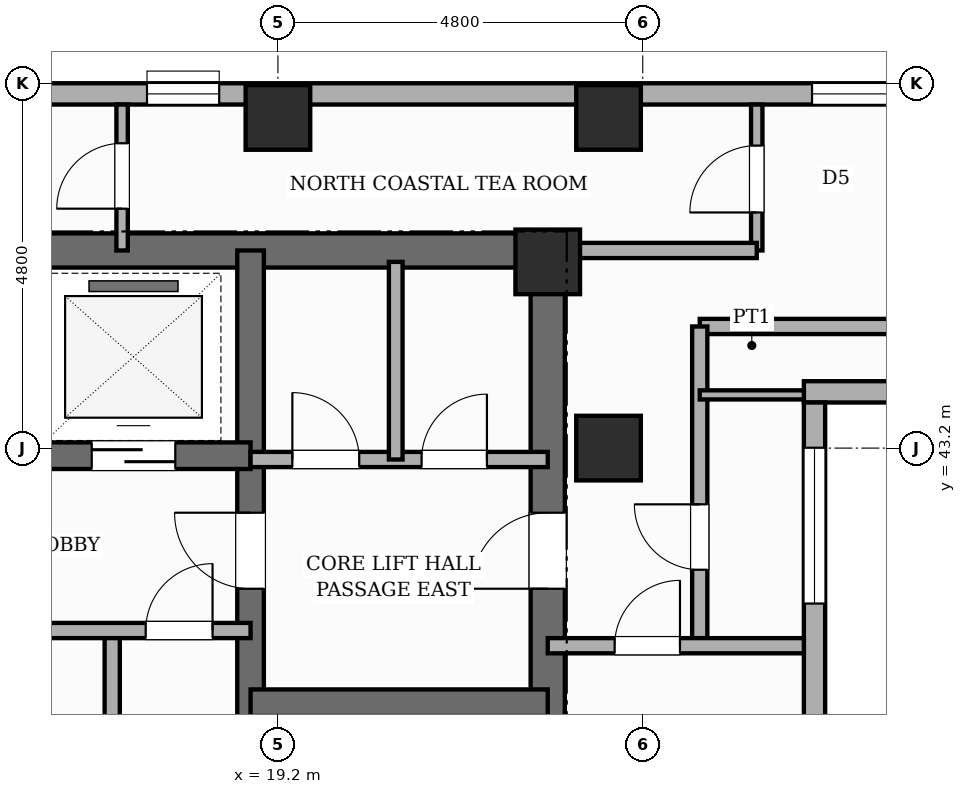
"""IFC4 building model, lengths in metres.
Left out: names, types, materials, properties, quantities, classifications, styles, units other than length and angle.
Written with IfcOpenShell. Run it as: python <this file> out.ifc"""

import sys

from ifc_helpers import new_model, si_unit, direction, frame, frame_2d, origin, origin_2d, place, context, subcontext, project, spatial, rectangle, extrude, element, fill, save


model = new_model("IFC4")
c1 = context("Model", 3, precision=1e-05, world=origin(), true_north=direction((0.0, 1.0)))
c2 = subcontext(c1, "Body", "Model", "MODEL_VIEW")
j1 = project(units=[si_unit("LENGTHUNIT", "METRE"), si_unit("PLANEANGLEUNIT", "RADIAN")], contexts=[c1])
p1 = place(None, origin())
s1 = spatial("IfcSite", under=j1, at=p1, CompositionType="ELEMENT")
p2 = place(p1, origin())
s2 = spatial("IfcBuilding", under=s1, at=p2, CompositionType="ELEMENT")
p3 = place(p2, frame((0.0, 0.0, 203.8)))
s3 = spatial("IfcBuildingStorey", under=s2, at=p3, CompositionType="ELEMENT", Elevation=203.8)
p4 = place(p3, frame((22.75, 30.675, 0.0), z_axis=(0.0, 0.0, 1.0), x_axis=(0.0, 1.0, 0.0)))
e1 = element("IfcWall", 1, at=p4, inside=s3, PredefinedType="SHEAR", context=c2, shape_type="SweptSolid", body=[
    extrude(rectangle(XDim=15.35, YDim=0.45, at=frame_2d((7.675, 0.0))), origin(), (0.0, 0.0, 1.0), 3.6),
])
p5 = place(p4, frame((10.675, 0.0, 0.0)))
e2 = element("IfcOpeningElement", 2, at=p5, cuts=e1, PredefinedType="OPENING", context=c2, shape_type="SweptSolid", body=[
    extrude(rectangle(XDim=1.0, YDim=2.15, at=frame_2d((0.5, 1.075))), frame((0.0, 0.235, 0.0), z_axis=(0.0, -1.0, 0.0), x_axis=(1.0, 0.0, 0.0)), (0.0, 0.0, 1.0), 0.47),
])
p6 = place(p3, frame((6.05, 45.8, 0.0), z_axis=(0.0, 0.0, 1.0), x_axis=(1.0, 0.0, 0.0)))
e3 = element("IfcWall", 3, at=p6, inside=s3, PredefinedType="SHEAR", context=c2, shape_type="SweptSolid", body=[
    extrude(rectangle(XDim=16.7, YDim=0.45, at=frame_2d((8.35, 0.0))), origin(), (0.0, 0.0, 1.0), 3.6),
])
p7 = place(p3, frame((18.84, 30.9, 0.0), z_axis=(0.0, 0.0, 1.0), x_axis=(0.0, 1.0, 0.0)))
e4 = element("IfcWall", 4, at=p7, inside=s3, PredefinedType="SHEAR", context=c2, shape_type="SweptSolid", body=[
    extrude(rectangle(XDim=14.9, YDim=0.35, at=frame_2d((7.45, 0.0))), origin(), (0.0, 0.0, 1.0), 3.6),
])
p8 = place(p7, frame((0.65, 0.0, 0.0)))
e5 = element("IfcOpeningElement", 5, at=p8, cuts=e4, PredefinedType="OPENING", context=c2, shape_type="SweptSolid", body=[
    extrude(rectangle(XDim=0.95, YDim=2.1, at=frame_2d((0.475, 1.05))), frame((0.0, 0.185, 0.0), z_axis=(0.0, -1.0, 0.0), x_axis=(1.0, 0.0, 0.0)), (0.0, 0.0, 1.0), 0.37),
])
p9 = place(p7, frame((10.45, 0.0, 0.0)))
e6 = element("IfcOpeningElement", 6, at=p9, cuts=e4, PredefinedType="OPENING", context=c2, shape_type="SweptSolid", body=[
    extrude(rectangle(XDim=1.0, YDim=2.15, at=frame_2d((0.5, 1.075))), frame((0.0, 0.185, 0.0), z_axis=(0.0, -1.0, 0.0), x_axis=(1.0, 0.0, 0.0)), (0.0, 0.0, 1.0), 0.37),
])
p10 = place(p3, frame((18.84, 39.85, 0.0), z_axis=(0.0, 0.0, 1.0), x_axis=(1.0, 0.0, 0.0)))
e7 = element("IfcWall", 7, at=p10, inside=s3, PredefinedType="SHEAR", context=c2, shape_type="SweptSolid", body=[
    extrude(rectangle(XDim=3.91, YDim=0.35, at=frame_2d((1.955, 0.0))), origin(), (0.0, 0.0, 1.0), 3.6),
])
p11 = place(p3, frame((9.96, 43.1, 0.0), z_axis=(0.0, 0.0, 1.0), x_axis=(1.0, 0.0, 0.0)))
e8 = element("IfcWall", 8, at=p11, inside=s3, PredefinedType="SHEAR", context=c2, shape_type="SweptSolid", body=[
    extrude(rectangle(XDim=8.88, YDim=0.35, at=frame_2d((4.44, 0.0))), origin(), (0.0, 0.0, 1.0), 3.6),
])
p12 = place(p11, frame((0.99, 0.0, 0.0)))
e9 = element("IfcOpeningElement", 9, at=p12, cuts=e8, PredefinedType="OPENING", context=c2, shape_type="SweptSolid", body=[
    extrude(rectangle(XDim=1.1, YDim=2.15, at=frame_2d((0.55, 1.075))), frame((0.0, 0.185, 0.0), z_axis=(0.0, -1.0, 0.0), x_axis=(1.0, 0.0, 0.0)), (0.0, 0.0, 1.0), 0.37),
])
p13 = place(p11, frame((3.89, 0.0, 0.0)))
e10 = element("IfcOpeningElement", 10, at=p13, cuts=e8, PredefinedType="OPENING", context=c2, shape_type="SweptSolid", body=[
    extrude(rectangle(XDim=1.1, YDim=2.15, at=frame_2d((0.55, 1.075))), frame((0.0, 0.185, 0.0), z_axis=(0.0, -1.0, 0.0), x_axis=(1.0, 0.0, 0.0)), (0.0, 0.0, 1.0), 0.37),
])
p14 = place(p11, frame((6.79, 0.0, 0.0)))
e11 = element("IfcOpeningElement", 11, at=p14, cuts=e8, PredefinedType="OPENING", context=c2, shape_type="SweptSolid", body=[
    extrude(rectangle(XDim=1.1, YDim=2.15, at=frame_2d((0.55, 1.075))), frame((0.0, 0.185, 0.0), z_axis=(0.0, -1.0, 0.0), x_axis=(1.0, 0.0, 0.0)), (0.0, 0.0, 1.0), 0.37),
])
for number, where, z_axis, x_axis in (
    (12, (19.2, 47.55, 0.0), (0.0, 0.0, 1.0), (1.0, 0.0, 0.0)),
    (13, (22.75, 45.65, 0.0), (0.0, 0.0, 1.0), (1.0, 0.0, 0.0)),
    (14, (23.55, 43.2, 0.0), (0.0, 0.0, 1.0), (1.0, 0.0, 0.0)),
    (15, (23.55, 47.55, 0.0), (0.0, 0.0, 1.0), (1.0, 0.0, 0.0)),
):
    element("IfcColumn", number, at=place(p3, frame(where, z_axis=z_axis, x_axis=x_axis)), inside=s3, PredefinedType="COLUMN", context=c2, shape_type="SweptSolid", body=[
        extrude(rectangle(XDim=0.85, YDim=0.85, at=origin_2d()), origin(), (0.0, 0.0, 1.0), 3.6),
    ])
p15 = place(p3, frame((7.2, 47.86, 0.0), z_axis=(0.0, 0.0, 1.0), x_axis=(1.0, 0.0, 0.0)))
e16 = element("IfcWall", 16, at=p15, inside=s3, PredefinedType="STANDARD", context=c2, shape_type="SweptSolid", body=[
    extrude(rectangle(XDim=43.2, YDim=0.28, at=frame_2d((21.6, 0.0))), origin(), (0.0, 0.0, 1.0), 2.66),
])
p16 = place(p15, frame((19.028, 0.0, 0.65)))
e17 = element("IfcOpeningElement", 17, at=p16, cuts=e16, PredefinedType="OPENING", context=c2, shape_type="SweptSolid", body=[
    extrude(rectangle(XDim=1.4, YDim=1.1, at=frame_2d((0.7, 0.55))), frame((0.0, 0.15, 0.0), z_axis=(0.0, -1.0, 0.0), x_axis=(1.0, 0.0, 0.0)), (0.0, 0.0, 1.0), 0.3),
])
p17 = place(p15, frame((0.308, 0.0, 0.65)))
e18 = element("IfcOpeningElement", 18, at=p17, cuts=e16, PredefinedType="OPENING", context=c2, shape_type="SweptSolid", body=[
    extrude(rectangle(XDim=1.4, YDim=1.1, at=frame_2d((0.7, 0.55))), frame((0.0, 0.15, 0.0), z_axis=(0.0, -1.0, 0.0), x_axis=(1.0, 0.0, 0.0)), (0.0, 0.0, 1.0), 0.3),
])
p18 = place(p15, frame((10.278, 0.0, 0.45)))
e19 = element("IfcOpeningElement", 19, at=p18, cuts=e16, PredefinedType="OPENING", context=c2, shape_type="SweptSolid", body=[
    extrude(rectangle(XDim=0.95, YDim=1.8, at=frame_2d((0.475, 0.9))), frame((0.0, 0.15, 0.0), z_axis=(0.0, -1.0, 0.0), x_axis=(1.0, 0.0, 0.0)), (0.0, 0.0, 1.0), 0.3),
])
p19 = place(p3, frame((38.4, 43.94, 0.0), z_axis=(0.0, 0.0, 1.0), x_axis=(-1.0, 0.0, 0.0)))
e20 = element("IfcWall", 20, at=p19, inside=s3, PredefinedType="STANDARD", context=c2, shape_type="SweptSolid", body=[
    extrude(rectangle(XDim=12.28, YDim=0.28, at=frame_2d((6.14, 0.0))), origin(), (0.0, 0.0, 1.0), 3.38),
])
p20 = place(p19, frame((5.115, 0.0, 0.8)))
e21 = element("IfcOpeningElement", 21, at=p20, cuts=e20, PredefinedType="OPENING", context=c2, shape_type="SweptSolid", body=[
    extrude(rectangle(XDim=2.05, YDim=1.95, at=frame_2d((1.025, 0.975))), frame((0.0, 0.15, 0.0), z_axis=(0.0, -1.0, 0.0), x_axis=(1.0, 0.0, 0.0)), (0.0, 0.0, 1.0), 0.3),
])
p21 = place(p3, frame((26.26, 43.8, 0.0), z_axis=(0.0, 0.0, 1.0), x_axis=(0.0, -1.0, 0.0)))
e22 = element("IfcWall", 22, at=p21, inside=s3, PredefinedType="STANDARD", context=c2, shape_type="SweptSolid", body=[
    extrude(rectangle(XDim=15.0, YDim=0.28, at=frame_2d((7.5, 0.0))), origin(), (0.0, 0.0, 1.0), 3.38),
])
p22 = place(p21, frame((10.59, 0.0, 0.8)))
e23 = element("IfcOpeningElement", 23, at=p22, cuts=e22, PredefinedType="OPENING", context=c2, shape_type="SweptSolid", body=[
    extrude(rectangle(XDim=2.05, YDim=1.95, at=frame_2d((1.025, 0.975))), frame((0.0, 0.15, 0.0), z_axis=(0.0, -1.0, 0.0), x_axis=(1.0, 0.0, 0.0)), (0.0, 0.0, 1.0), 0.3),
])
p23 = place(p21, frame((5.245, 0.0, 0.8)))
e24 = element("IfcOpeningElement", 24, at=p23, cuts=e22, PredefinedType="OPENING", context=c2, shape_type="SweptSolid", body=[
    extrude(rectangle(XDim=2.05, YDim=1.95, at=frame_2d((1.025, 0.975))), frame((0.0, 0.15, 0.0), z_axis=(0.0, -1.0, 0.0), x_axis=(1.0, 0.0, 0.0)), (0.0, 0.0, 1.0), 0.3),
])
p24 = place(p21, frame((0.595, 0.0, 0.8)))
e25 = element("IfcOpeningElement", 25, at=p24, cuts=e22, PredefinedType="OPENING", context=c2, shape_type="SweptSolid", body=[
    extrude(rectangle(XDim=2.05, YDim=1.95, at=frame_2d((1.025, 0.975))), frame((0.0, 0.15, 0.0), z_axis=(0.0, -1.0, 0.0), x_axis=(1.0, 0.0, 0.0)), (0.0, 0.0, 1.0), 0.3),
])
p25 = place(p3, frame((17.02, 35.65, 0.0), z_axis=(0.0, 0.0, 1.0), x_axis=(0.0, 1.0, 0.0)))
e26 = element("IfcWall", 26, at=p25, inside=s3, PredefinedType="POLYGONAL", context=c2, shape_type="SweptSolid", body=[
    extrude(rectangle(XDim=5.15, YDim=0.2, at=frame_2d((2.575, 0.0))), origin(), (0.0, 0.0, 1.0), 3.38),
])
p26 = place(p3, frame((9.96, 40.8, 0.0), z_axis=(0.0, 0.0, 1.0), x_axis=(1.0, 0.0, 0.0)))
e27 = element("IfcWall", 27, at=p26, inside=s3, PredefinedType="POLYGONAL", context=c2, shape_type="SweptSolid", body=[
    extrude(rectangle(XDim=8.88, YDim=0.2, at=frame_2d((4.44, 0.0))), origin(), (0.0, 0.0, 1.0), 3.38),
])
p27 = place(p26, frame((7.5, 0.0, 0.0)))
e28 = element("IfcOpeningElement", 28, at=p27, cuts=e27, PredefinedType="OPENING", context=c2, shape_type="SweptSolid", body=[
    extrude(rectangle(XDim=0.88, YDim=2.1, at=frame_2d((0.44, 1.05))), frame((0.0, 0.11, 0.0), z_axis=(0.0, -1.0, 0.0), x_axis=(1.0, 0.0, 0.0)), (0.0, 0.0, 1.0), 0.22),
])
p28 = place(p26, frame((3.6, 0.0, 0.0)))
e29 = element("IfcOpeningElement", 29, at=p28, cuts=e27, PredefinedType="OPENING", context=c2, shape_type="SweptSolid", body=[
    extrude(rectangle(XDim=0.88, YDim=2.1, at=frame_2d((0.44, 1.05))), frame((0.0, 0.11, 0.0), z_axis=(0.0, -1.0, 0.0), x_axis=(1.0, 0.0, 0.0)), (0.0, 0.0, 1.0), 0.22),
])
p29 = place(p3, frame((18.84, 43.05, 0.0), z_axis=(0.0, 0.0, 1.0), x_axis=(1.0, 0.0, 0.0)))
e30 = element("IfcWall", 30, at=p29, inside=s3, PredefinedType="POLYGONAL", context=c2, shape_type="SweptSolid", body=[
    extrude(rectangle(XDim=3.91, YDim=0.2, at=frame_2d((1.955, 0.0))), origin(), (0.0, 0.0, 1.0), 2.66),
])
p30 = place(p29, frame((0.55, 0.0, 0.0)))
e31 = element("IfcOpeningElement", 31, at=p30, cuts=e30, PredefinedType="OPENING", context=c2, shape_type="SweptSolid", body=[
    extrude(rectangle(XDim=0.88, YDim=2.1, at=frame_2d((0.44, 1.05))), frame((0.0, 0.11, 0.0), z_axis=(0.0, -1.0, 0.0), x_axis=(1.0, 0.0, 0.0)), (0.0, 0.0, 1.0), 0.22),
])
p31 = place(p29, frame((2.25, 0.0, 0.0)))
e32 = element("IfcOpeningElement", 32, at=p31, cuts=e30, PredefinedType="OPENING", context=c2, shape_type="SweptSolid", body=[
    extrude(rectangle(XDim=0.86, YDim=2.1, at=frame_2d((0.43, 1.05))), frame((0.0, 0.11, 0.0), z_axis=(0.0, -1.0, 0.0), x_axis=(1.0, 0.0, 0.0)), (0.0, 0.0, 1.0), 0.22),
])
p32 = place(p3, frame((20.75, 43.05, 0.0), z_axis=(0.0, 0.0, 1.0), x_axis=(0.0, 1.0, 0.0)))
e33 = element("IfcWall", 33, at=p32, inside=s3, PredefinedType="PLUMBINGWALL", context=c2, shape_type="SweptSolid", body=[
    extrude(rectangle(XDim=2.6, YDim=0.18, at=frame_2d((1.3, 0.0))), origin(), (0.0, 0.0, 1.0), 3.38),
])
p33 = place(p3, frame((25.5, 45.8, 0.0), z_axis=(0.0, 0.0, 1.0), x_axis=(0.0, 1.0, 0.0)))
e34 = element("IfcWall", 34, at=p33, inside=s3, PredefinedType="PARTITIONING", context=c2, shape_type="SweptSolid", body=[
    extrude(rectangle(XDim=1.92, YDim=0.15, at=frame_2d((0.96, 0.0))), origin(), (0.0, 0.0, 1.0), 3.38),
])
p34 = place(p33, frame((0.5, 0.0, 0.0)))
e35 = element("IfcOpeningElement", 35, at=p34, cuts=e34, PredefinedType="OPENING", context=c2, shape_type="SweptSolid", body=[
    extrude(rectangle(XDim=0.88, YDim=2.1, at=frame_2d((0.44, 1.05))), frame((0.0, 0.085, 0.0), z_axis=(0.0, -1.0, 0.0), x_axis=(1.0, 0.0, 0.0)), (0.0, 0.0, 1.0), 0.17),
])
p35 = place(p3, frame((22.75, 45.8, 0.0), z_axis=(0.0, 0.0, 1.0), x_axis=(1.0, 0.0, 0.0)))
e36 = element("IfcWall", 36, at=p35, inside=s3, PredefinedType="PARTITIONING", context=c2, shape_type="SweptSolid", body=[
    extrude(rectangle(XDim=2.75, YDim=0.2, at=frame_2d((1.375, 0.0))), origin(), (0.0, 0.0, 1.0), 3.38),
])
p36 = place(p3, frame((17.15, 45.8, 0.0), z_axis=(0.0, 0.0, 1.0), x_axis=(0.0, 1.0, 0.0)))
e37 = element("IfcWall", 37, at=p36, inside=s3, PredefinedType="PARTITIONING", context=c2, shape_type="SweptSolid", body=[
    extrude(rectangle(XDim=1.92, YDim=0.15, at=frame_2d((0.96, 0.0))), origin(), (0.0, 0.0, 1.0), 3.38),
])
p37 = place(p36, frame((0.55, 0.0, 0.0)))
e38 = element("IfcOpeningElement", 38, at=p37, cuts=e37, PredefinedType="OPENING", context=c2, shape_type="SweptSolid", body=[
    extrude(rectangle(XDim=0.86, YDim=2.1, at=frame_2d((0.43, 1.05))), frame((0.0, 0.085, 0.0), z_axis=(0.0, -1.0, 0.0), x_axis=(1.0, 0.0, 0.0)), (0.0, 0.0, 1.0), 0.17),
])
p38 = place(p3, frame((24.75, 44.8, 0.0), z_axis=(0.0, 0.0, 1.0), x_axis=(1.0, 0.0, 0.0)))
e39 = element("IfcWall", 39, at=p38, inside=s3, PredefinedType="PARTITIONING", context=c2, shape_type="SweptSolid", body=[
    extrude(rectangle(XDim=17.3, YDim=0.2, at=frame_2d((8.65, 0.0))), origin(), (0.0, 0.0, 1.0), 3.38),
])
p39 = place(p38, frame((6.2, 0.0, 0.0)))
e40 = element("IfcOpeningElement", 40, at=p39, cuts=e39, PredefinedType="OPENING", context=c2, shape_type="SweptSolid", body=[
    extrude(rectangle(XDim=0.95, YDim=2.15, at=frame_2d((0.475, 1.075))), frame((0.0, 0.11, 0.0), z_axis=(0.0, -1.0, 0.0), x_axis=(1.0, 0.0, 0.0)), (0.0, 0.0, 1.0), 0.22),
])
p40 = place(p3, frame((24.75, 40.6, 0.0), z_axis=(0.0, 0.0, 1.0), x_axis=(0.0, 1.0, 0.0)))
e41 = element("IfcWall", 41, at=p40, inside=s3, PredefinedType="PARTITIONING", context=c2, shape_type="SweptSolid", body=[
    extrude(rectangle(XDim=4.2, YDim=0.2, at=frame_2d((2.1, 0.0))), origin(), (0.0, 0.0, 1.0), 3.38),
])
p41 = place(p40, frame((1.0, 0.0, 0.0)))
e42 = element("IfcOpeningElement", 42, at=p41, cuts=e41, PredefinedType="OPENING", context=c2, shape_type="SweptSolid", body=[
    extrude(rectangle(XDim=0.86, YDim=2.1, at=frame_2d((0.43, 1.05))), frame((0.0, 0.11, 0.0), z_axis=(0.0, -1.0, 0.0), x_axis=(1.0, 0.0, 0.0)), (0.0, 0.0, 1.0), 0.22),
])
p42 = place(p3, frame((24.75, 43.9, 0.0), z_axis=(0.0, 0.0, 1.0), x_axis=(1.0, 0.0, 0.0)))
e43 = element("IfcWall", 43, at=p42, inside=s3, PredefinedType="PARTITIONING", context=c2, shape_type="SweptSolid", body=[
    extrude(rectangle(XDim=1.37, YDim=0.12, at=frame_2d((0.685, 0.0))), origin(), (0.0, 0.0, 1.0), 3.38),
])
p43 = place(p3, frame((22.75, 40.6, 0.0), z_axis=(0.0, 0.0, 1.0), x_axis=(1.0, 0.0, 0.0)))
e44 = element("IfcWall", 44, at=p43, inside=s3, PredefinedType="PARTITIONING", context=c2, shape_type="SweptSolid", body=[
    extrude(rectangle(XDim=3.37, YDim=0.2, at=frame_2d((1.685, 0.0))), origin(), (0.0, 0.0, 1.0), 3.38),
])
p44 = place(p43, frame((0.88, 0.0, 0.0)))
e45 = element("IfcOpeningElement", 45, at=p44, cuts=e44, PredefinedType="OPENING", context=c2, shape_type="SweptSolid", body=[
    extrude(rectangle(XDim=0.86, YDim=2.1, at=frame_2d((0.43, 1.05))), frame((0.0, 0.11, 0.0), z_axis=(0.0, -1.0, 0.0), x_axis=(1.0, 0.0, 0.0)), (0.0, 0.0, 1.0), 0.22),
])
p45 = place(p16, origin())
e46 = element("IfcWindow", 46, at=p45, inside=s3, PartitioningType="SINGLE_PANEL", PredefinedType="WINDOW", context=c2, shape_type="SweptSolid", body=[
    extrude(rectangle(XDim=1.4, YDim=1.1, at=frame_2d((0.7, 0.55))), frame((0.0, 0.03, 0.0), z_axis=(0.0, -1.0, 0.0), x_axis=(1.0, 0.0, 0.0)), (0.0, 0.0, 1.0), 0.06),
])
fill(e17, e46)
p46 = place(p18, origin())
e47 = element("IfcWindow", 47, at=p46, inside=s3, PartitioningType="SINGLE_PANEL", PredefinedType="WINDOW", context=c2, shape_type="SweptSolid", body=[
    extrude(rectangle(XDim=0.95, YDim=1.8, at=frame_2d((0.475, 0.9))), frame((0.0, 0.03, 0.0), z_axis=(0.0, -1.0, 0.0), x_axis=(1.0, 0.0, 0.0)), (0.0, 0.0, 1.0), 0.06),
])
fill(e19, e47)
p47 = place(p24, origin())
e48 = element("IfcWindow", 48, at=p47, inside=s3, PartitioningType="SINGLE_PANEL", PredefinedType="WINDOW", context=c2, shape_type="SweptSolid", body=[
    extrude(rectangle(XDim=2.05, YDim=1.95, at=frame_2d((1.025, 0.975))), frame((0.0, 0.03, 0.0), z_axis=(0.0, -1.0, 0.0), x_axis=(1.0, 0.0, 0.0)), (0.0, 0.0, 1.0), 0.06),
])
fill(e25, e48)
p48 = place(p27, origin())
e49 = element("IfcDoor", 49, at=p48, inside=s3, OperationType="SINGLE_SWING_RIGHT", PredefinedType="DOOR", context=c2, shape_type="SweptSolid", body=[
    extrude(rectangle(XDim=0.88, YDim=2.1, at=frame_2d((0.44, 1.05))), frame((0.0, 0.025, 0.0), z_axis=(0.0, -1.0, 0.0), x_axis=(1.0, 0.0, 0.0)), (0.0, 0.0, 1.0), 0.05),
])
fill(e28, e49)
p49 = place(p14, origin())
e50 = element("IfcDoor", 50, at=p49, inside=s3, OperationType="SLIDING_TO_LEFT", PredefinedType="DOOR", context=c2, shape_type="SweptSolid", body=[
    extrude(rectangle(XDim=1.1, YDim=2.15, at=frame_2d((0.55, 1.075))), frame((0.0, 0.025, 0.0), z_axis=(0.0, -1.0, 0.0), x_axis=(1.0, 0.0, 0.0)), (0.0, 0.0, 1.0), 0.05),
])
fill(e11, e50)
p50 = place(p9, origin())
e51 = element("IfcDoor", 51, at=p50, inside=s3, OperationType="SINGLE_SWING_RIGHT", PredefinedType="DOOR", context=c2, shape_type="SweptSolid", body=[
    extrude(rectangle(XDim=1.0, YDim=2.15, at=frame_2d((0.5, 1.075))), frame((0.0, 0.025, 0.0), z_axis=(0.0, -1.0, 0.0), x_axis=(1.0, 0.0, 0.0)), (0.0, 0.0, 1.0), 0.05),
])
fill(e6, e51)
p51 = place(p5, origin())
e52 = element("IfcDoor", 52, at=p51, inside=s3, OperationType="SINGLE_SWING_LEFT", PredefinedType="DOOR", context=c2, shape_type="SweptSolid", body=[
    extrude(rectangle(XDim=1.0, YDim=2.15, at=frame_2d((0.5, 1.075))), frame((0.0, 0.025, 0.0), z_axis=(0.0, -1.0, 0.0), x_axis=(1.0, 0.0, 0.0)), (0.0, 0.0, 1.0), 0.05),
])
fill(e2, e52)
p52 = place(p30, origin())
e53 = element("IfcDoor", 53, at=p52, inside=s3, OperationType="SINGLE_SWING_LEFT", PredefinedType="DOOR", context=c2, shape_type="SweptSolid", body=[
    extrude(rectangle(XDim=0.88, YDim=2.1, at=frame_2d((0.44, 1.05))), frame((0.0, 0.025, 0.0), z_axis=(0.0, -1.0, 0.0), x_axis=(1.0, 0.0, 0.0)), (0.0, 0.0, 1.0), 0.05),
])
fill(e31, e53)
p53 = place(p31, origin())
e54 = element("IfcDoor", 54, at=p53, inside=s3, OperationType="SINGLE_SWING_RIGHT", PredefinedType="DOOR", context=c2, shape_type="SweptSolid", body=[
    extrude(rectangle(XDim=0.86, YDim=2.1, at=frame_2d((0.43, 1.05))), frame((0.0, 0.025, 0.0), z_axis=(0.0, -1.0, 0.0), x_axis=(1.0, 0.0, 0.0)), (0.0, 0.0, 1.0), 0.05),
])
fill(e32, e54)
p54 = place(p34, origin())
e55 = element("IfcDoor", 55, at=p54, inside=s3, OperationType="SINGLE_SWING_LEFT", PredefinedType="DOOR", context=c2, shape_type="SweptSolid", body=[
    extrude(rectangle(XDim=0.88, YDim=2.1, at=frame_2d((0.44, 1.05))), frame((0.0, 0.025, 0.0), z_axis=(0.0, -1.0, 0.0), x_axis=(1.0, 0.0, 0.0)), (0.0, 0.0, 1.0), 0.05),
])
fill(e35, e55)
p55 = place(p37, origin())
e56 = element("IfcDoor", 56, at=p55, inside=s3, OperationType="SINGLE_SWING_LEFT", PredefinedType="DOOR", context=c2, shape_type="SweptSolid", body=[
    extrude(rectangle(XDim=0.86, YDim=2.1, at=frame_2d((0.43, 1.05))), frame((0.0, 0.025, 0.0), z_axis=(0.0, -1.0, 0.0), x_axis=(1.0, 0.0, 0.0)), (0.0, 0.0, 1.0), 0.05),
])
fill(e38, e56)
p56 = place(p41, origin())
e57 = element("IfcDoor", 57, at=p56, inside=s3, OperationType="SINGLE_SWING_RIGHT", PredefinedType="DOOR", context=c2, shape_type="SweptSolid", body=[
    extrude(rectangle(XDim=0.86, YDim=2.1, at=frame_2d((0.43, 1.05))), frame((0.0, 0.025, 0.0), z_axis=(0.0, -1.0, 0.0), x_axis=(1.0, 0.0, 0.0)), (0.0, 0.0, 1.0), 0.05),
])
fill(e42, e57)
p57 = place(p44, origin())
e58 = element("IfcDoor", 58, at=p57, inside=s3, OperationType="SINGLE_SWING_RIGHT", PredefinedType="DOOR", context=c2, shape_type="SweptSolid", body=[
    extrude(rectangle(XDim=0.86, YDim=2.1, at=frame_2d((0.43, 1.05))), frame((0.0, 0.025, 0.0), z_axis=(0.0, -1.0, 0.0), x_axis=(1.0, 0.0, 0.0)), (0.0, 0.0, 1.0), 0.05),
])
fill(e45, e58)
save(model, sys.argv[1])
